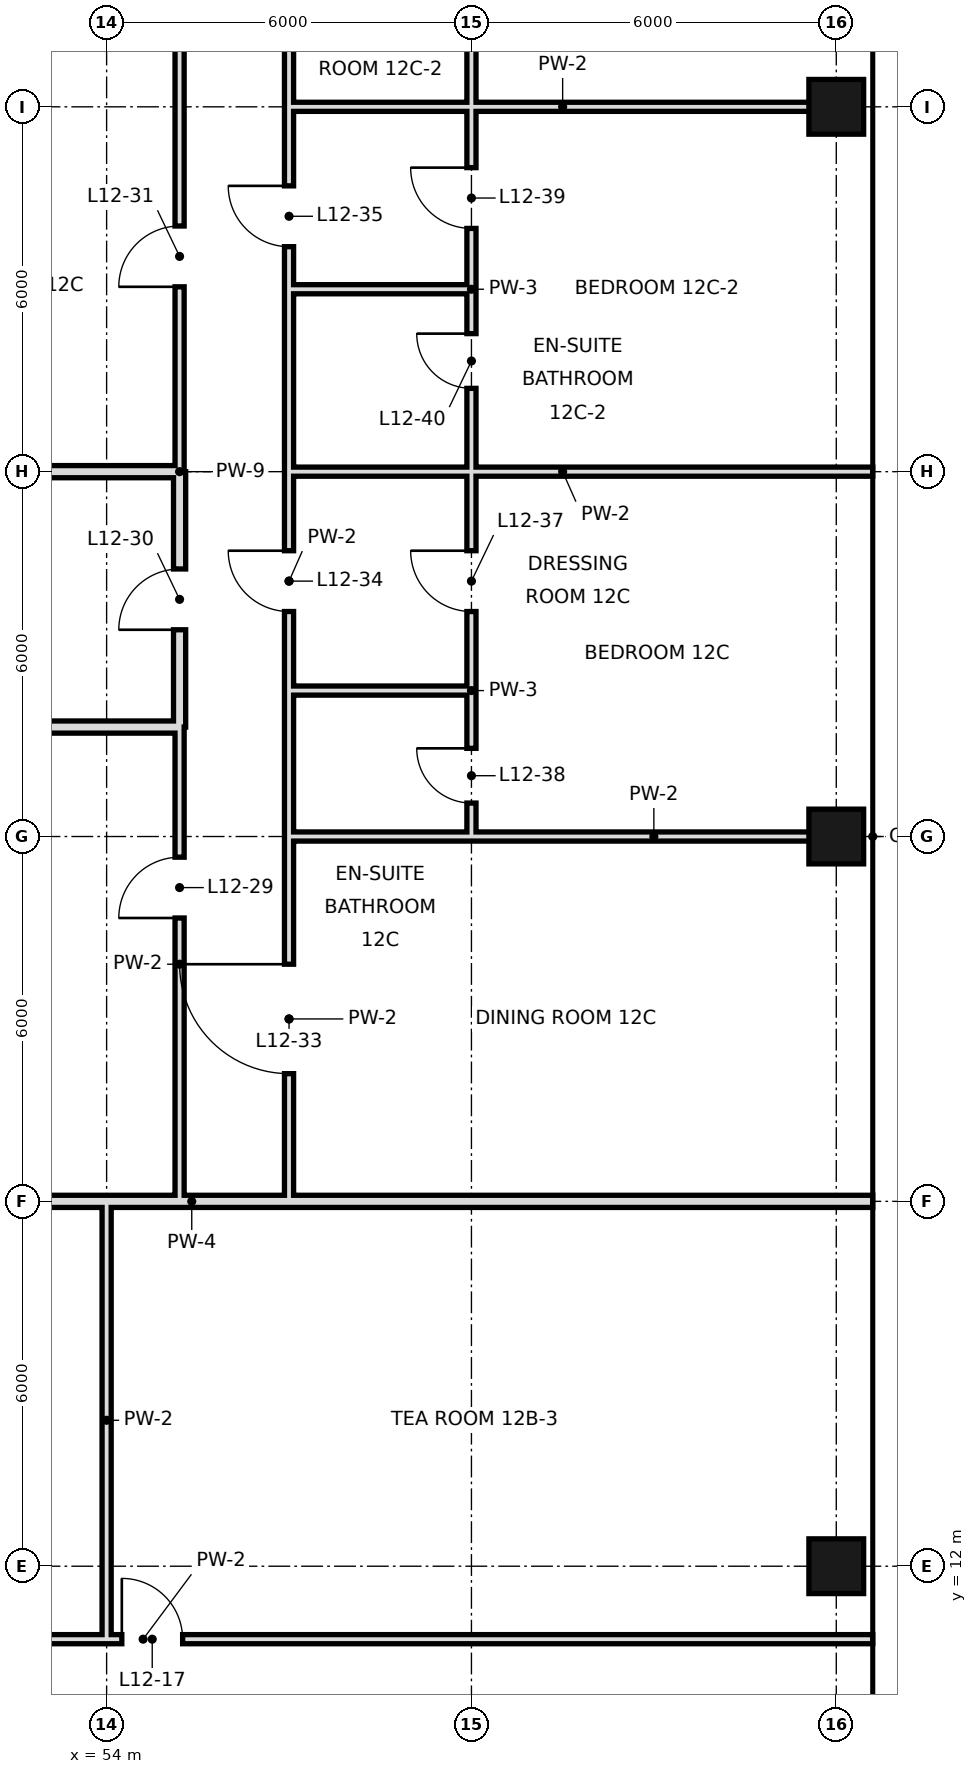
"""IFC4 building model, lengths in metres.
Left out: names, types, materials, properties, quantities, classifications, styles, units other than length and angle.
Written with IfcOpenShell. Run it as: python <this file> out.ifc"""

import sys

from ifc_helpers import new_model, si_unit, direction, frame, frame_2d, origin, origin_2d, place, context, subcontext, project, spatial, rectangle, hollow_rectangle, extrude, element, fill, save


model = new_model("IFC4")
c1 = context("Model", 3, precision=1e-05, world=origin(), true_north=direction((0.0, 1.0)))
c2 = subcontext(c1, "Body", "Model", "MODEL_VIEW")
j1 = project(units=[si_unit("LENGTHUNIT", "METRE"), si_unit("PLANEANGLEUNIT", "RADIAN")], contexts=[c1])
p1 = place(None, origin())
s1 = spatial("IfcSite", under=j1, at=p1, CompositionType="ELEMENT")
p2 = place(p1, origin())
s2 = spatial("IfcBuilding", under=s1, at=p2, CompositionType="ELEMENT")
p3 = place(p2, frame((0.0, 0.0, 64.2)))
s3 = spatial("IfcBuildingStorey", under=s2, at=p3, CompositionType="ELEMENT", Elevation=64.2)
for number, where, z_axis, x_axis in (
    (1, (66.0, 12.0, 0.0), (0.0, 0.0, 1.0), (1.0, 0.0, 0.0)),
    (2, (66.0, 24.0, 0.0), (0.0, 0.0, 1.0), (1.0, 0.0, 0.0)),
    (3, (66.0, 36.0, 0.0), (0.0, 0.0, 1.0), (1.0, 0.0, 0.0)),
):
    element("IfcColumn", number, at=place(p3, frame(where, z_axis=z_axis, x_axis=x_axis)), inside=s3, PredefinedType="COLUMN", context=c2, shape_type="SweptSolid", body=[
        extrude(hollow_rectangle(XDim=0.9, YDim=0.9, WallThickness=0.045, at=origin_2d()), origin(), (0.0, 0.0, 1.0), 3.6),
    ])
p4 = place(p3, frame((54.0, 10.8, 0.0), z_axis=(0.0, 0.0, 1.0), x_axis=(0.0, 1.0, 0.0)))
e4 = element("IfcWall", 4, at=p4, inside=s3, PredefinedType="PARTITIONING", context=c2, shape_type="SweptSolid", body=[
    extrude(rectangle(XDim=7.2, YDim=0.15, at=frame_2d((3.6, 0.0))), origin(), (0.0, 0.0, 1.0), 3.42),
])
p5 = place(p3, frame((55.2, 25.8, 0.0), z_axis=(0.0, 0.0, 1.0), x_axis=(0.0, 1.0, 0.0)))
e5 = element("IfcWall", 5, at=p5, inside=s3, PredefinedType="SOLIDWALL", context=c2, shape_type="SweptSolid", body=[
    extrude(rectangle(XDim=4.2, YDim=0.2, at=frame_2d((2.1, 0.0))), origin(), (0.0, 0.0, 1.0), 2.52),
])
p6 = place(p5, frame((1.6, 0.0, 0.0)))
e6 = element("IfcOpeningElement", 6, at=p6, cuts=e5, PredefinedType="OPENING", context=c2, shape_type="SweptSolid", body=[
    extrude(rectangle(XDim=1.0, YDim=2.4, at=frame_2d((0.5, 1.2))), frame((0.0, 0.11, 0.0), z_axis=(0.0, -1.0, 0.0), x_axis=(1.0, 0.0, 0.0)), (0.0, 0.0, 1.0), 0.22),
])
p7 = place(p3, frame((55.2, 18.0, 0.0), z_axis=(0.0, 0.0, 1.0), x_axis=(0.0, 1.0, 0.0)))
e7 = element("IfcWall", 7, at=p7, inside=s3, PredefinedType="PARTITIONING", context=c2, shape_type="SweptSolid", body=[
    extrude(rectangle(XDim=7.8, YDim=0.15, at=frame_2d((3.9, 0.0))), origin(), (0.0, 0.0, 1.0), 3.42),
])
p8 = place(p7, frame((4.66, 0.0, 0.0)))
e8 = element("IfcOpeningElement", 8, at=p8, cuts=e7, PredefinedType="OPENING", context=c2, shape_type="SweptSolid", body=[
    extrude(rectangle(XDim=1.0, YDim=2.4, at=frame_2d((0.5, 1.2))), frame((0.0, 0.085, 0.0), z_axis=(0.0, -1.0, 0.0), x_axis=(1.0, 0.0, 0.0)), (0.0, 0.0, 1.0), 0.17),
])
p9 = place(p3, frame((55.2, 30.0, 0.0), z_axis=(0.0, 0.0, 1.0), x_axis=(0.0, 1.0, 0.0)))
e9 = element("IfcWall", 9, at=p9, inside=s3, PredefinedType="PARTITIONING", context=c2, shape_type="SweptSolid", body=[
    extrude(rectangle(XDim=15.6, YDim=0.15, at=frame_2d((7.8, 0.0))), origin(), (0.0, 0.0, 1.0), 3.42),
])
p10 = place(p9, frame((12.7, 0.0, 0.0)))
e10 = element("IfcOpeningElement", 10, at=p10, cuts=e9, PredefinedType="OPENING", context=c2, shape_type="SweptSolid", body=[
    extrude(rectangle(XDim=1.0, YDim=2.4, at=frame_2d((0.5, 1.2))), frame((0.0, 0.085, 0.0), z_axis=(0.0, -1.0, 0.0), x_axis=(1.0, 0.0, 0.0)), (0.0, 0.0, 1.0), 0.17),
])
p11 = place(p9, frame((3.04, 0.0, 0.0)))
e11 = element("IfcOpeningElement", 11, at=p11, cuts=e9, PredefinedType="OPENING", context=c2, shape_type="SweptSolid", body=[
    extrude(rectangle(XDim=1.0, YDim=2.4, at=frame_2d((0.5, 1.2))), frame((0.0, 0.085, 0.0), z_axis=(0.0, -1.0, 0.0), x_axis=(1.0, 0.0, 0.0)), (0.0, 0.0, 1.0), 0.17),
])
p12 = place(p3, frame((57.0, 18.0, 0.0), z_axis=(0.0, 0.0, 1.0), x_axis=(0.0, 1.0, 0.0)))
e12 = element("IfcWall", 12, at=p12, inside=s3, PredefinedType="PARTITIONING", context=c2, shape_type="SweptSolid", body=[
    extrude(rectangle(XDim=6.0, YDim=0.15, at=frame_2d((3.0, 0.0))), origin(), (0.0, 0.0, 1.0), 3.42),
])
p13 = place(p12, frame((2.1, 0.0, 0.0)))
e13 = element("IfcOpeningElement", 13, at=p13, cuts=e12, PredefinedType="OPENING", context=c2, shape_type="SweptSolid", body=[
    extrude(rectangle(XDim=1.8, YDim=2.4, at=frame_2d((0.9, 1.2))), frame((0.0, 0.085, 0.0), z_axis=(0.0, -1.0, 0.0), x_axis=(1.0, 0.0, 0.0)), (0.0, 0.0, 1.0), 0.17),
])
p14 = place(p3, frame((57.0, 26.4, 0.0), z_axis=(0.0, 0.0, 1.0), x_axis=(0.0, 1.0, 0.0)))
e14 = element("IfcWall", 14, at=p14, inside=s3, PredefinedType="PARTITIONING", context=c2, shape_type="SweptSolid", body=[
    extrude(rectangle(XDim=3.6, YDim=0.15, at=frame_2d((1.8, 0.0))), origin(), (0.0, 0.0, 1.0), 3.42),
])
p15 = place(p14, frame((1.3, 0.0, 0.0)))
e15 = element("IfcOpeningElement", 15, at=p15, cuts=e14, PredefinedType="OPENING", context=c2, shape_type="SweptSolid", body=[
    extrude(rectangle(XDim=1.0, YDim=2.4, at=frame_2d((0.5, 1.2))), frame((0.0, 0.085, 0.0), z_axis=(0.0, -1.0, 0.0), x_axis=(1.0, 0.0, 0.0)), (0.0, 0.0, 1.0), 0.17),
])
p16 = place(p3, frame((57.0, 33.0, 0.0), z_axis=(0.0, 0.0, 1.0), x_axis=(0.0, 1.0, 0.0)))
e16 = element("IfcWall", 16, at=p16, inside=s3, PredefinedType="PARTITIONING", context=c2, shape_type="SweptSolid", body=[
    extrude(rectangle(XDim=15.6, YDim=0.15, at=frame_2d((7.8, 0.0))), origin(), (0.0, 0.0, 1.0), 3.42),
])
p17 = place(p16, frame((0.7, 0.0, 0.0)))
e17 = element("IfcOpeningElement", 17, at=p17, cuts=e16, PredefinedType="OPENING", context=c2, shape_type="SweptSolid", body=[
    extrude(rectangle(XDim=1.0, YDim=2.4, at=frame_2d((0.5, 1.2))), frame((0.0, 0.085, 0.0), z_axis=(0.0, -1.0, 0.0), x_axis=(1.0, 0.0, 0.0)), (0.0, 0.0, 1.0), 0.17),
])
p18 = place(p16, frame((10.04, 0.0, 0.0)))
e18 = element("IfcOpeningElement", 18, at=p18, cuts=e16, PredefinedType="OPENING", context=c2, shape_type="SweptSolid", body=[
    extrude(rectangle(XDim=1.8, YDim=2.4, at=frame_2d((0.9, 1.2))), frame((0.0, 0.085, 0.0), z_axis=(0.0, -1.0, 0.0), x_axis=(1.0, 0.0, 0.0)), (0.0, 0.0, 1.0), 0.17),
])
p19 = place(p3, frame((57.0, 24.0, 0.0), z_axis=(0.0, 0.0, 1.0), x_axis=(0.0, 1.0, 0.0)))
e19 = element("IfcWall", 19, at=p19, inside=s3, PredefinedType="PARTITIONING", context=c2, shape_type="SweptSolid", body=[
    extrude(rectangle(XDim=2.4, YDim=0.15, at=frame_2d((1.2, 0.0))), origin(), (0.0, 0.0, 1.0), 3.42),
])
p20 = place(p3, frame((57.0, 30.0, 0.0), z_axis=(0.0, 0.0, 1.0), x_axis=(0.0, 1.0, 0.0)))
e20 = element("IfcWall", 20, at=p20, inside=s3, PredefinedType="PARTITIONING", context=c2, shape_type="SweptSolid", body=[
    extrude(rectangle(XDim=3.0, YDim=0.15, at=frame_2d((1.5, 0.0))), origin(), (0.0, 0.0, 1.0), 3.42),
])
p21 = place(p3, frame((60.0, 26.4, 0.0), z_axis=(0.0, 0.0, 1.0), x_axis=(0.0, 1.0, 0.0)))
e21 = element("IfcWall", 21, at=p21, inside=s3, PredefinedType="PARTITIONING", context=c2, shape_type="SweptSolid", body=[
    extrude(rectangle(XDim=3.6, YDim=0.15, at=frame_2d((1.8, 0.0))), origin(), (0.0, 0.0, 1.0), 3.42),
])
p22 = place(p21, frame((1.3, 0.0, 0.0)))
e22 = element("IfcOpeningElement", 22, at=p22, cuts=e21, PredefinedType="OPENING", context=c2, shape_type="SweptSolid", body=[
    extrude(rectangle(XDim=1.0, YDim=2.4, at=frame_2d((0.5, 1.2))), frame((0.0, 0.085, 0.0), z_axis=(0.0, -1.0, 0.0), x_axis=(1.0, 0.0, 0.0)), (0.0, 0.0, 1.0), 0.17),
])
p23 = place(p3, frame((60.0, 33.0, 0.0), z_axis=(0.0, 0.0, 1.0), x_axis=(0.0, 1.0, 0.0)))
e23 = element("IfcWall", 23, at=p23, inside=s3, PredefinedType="PARTITIONING", context=c2, shape_type="SweptSolid", body=[
    extrude(rectangle(XDim=15.0, YDim=0.15, at=frame_2d((7.5, 0.0))), origin(), (0.0, 0.0, 1.0), 3.42),
])
p24 = place(p23, frame((1.0, 0.0, 0.0)))
e24 = element("IfcOpeningElement", 24, at=p24, cuts=e23, PredefinedType="OPENING", context=c2, shape_type="SweptSolid", body=[
    extrude(rectangle(XDim=1.0, YDim=2.4, at=frame_2d((0.5, 1.2))), frame((0.0, 0.085, 0.0), z_axis=(0.0, -1.0, 0.0), x_axis=(1.0, 0.0, 0.0)), (0.0, 0.0, 1.0), 0.17),
])
p25 = place(p23, frame((10.04, 0.0, 0.0)))
e25 = element("IfcOpeningElement", 25, at=p25, cuts=e23, PredefinedType="OPENING", context=c2, shape_type="SweptSolid", body=[
    extrude(rectangle(XDim=1.8, YDim=2.4, at=frame_2d((0.9, 1.2))), frame((0.0, 0.085, 0.0), z_axis=(0.0, -1.0, 0.0), x_axis=(1.0, 0.0, 0.0)), (0.0, 0.0, 1.0), 0.17),
])
p26 = place(p3, frame((60.0, 24.0, 0.0), z_axis=(0.0, 0.0, 1.0), x_axis=(0.0, 1.0, 0.0)))
e26 = element("IfcWall", 26, at=p26, inside=s3, PredefinedType="PARTITIONING", context=c2, shape_type="SweptSolid", body=[
    extrude(rectangle(XDim=2.4, YDim=0.15, at=frame_2d((1.2, 0.0))), origin(), (0.0, 0.0, 1.0), 3.42),
])
p27 = place(p26, frame((0.55, 0.0, 0.0)))
e27 = element("IfcOpeningElement", 27, at=p27, cuts=e26, PredefinedType="OPENING", context=c2, shape_type="SweptSolid", body=[
    extrude(rectangle(XDim=0.9, YDim=2.4, at=frame_2d((0.45, 1.2))), frame((0.0, 0.085, 0.0), z_axis=(0.0, -1.0, 0.0), x_axis=(1.0, 0.0, 0.0)), (0.0, 0.0, 1.0), 0.17),
])
p28 = place(p3, frame((60.0, 30.0, 0.0), z_axis=(0.0, 0.0, 1.0), x_axis=(0.0, 1.0, 0.0)))
e28 = element("IfcWall", 28, at=p28, inside=s3, PredefinedType="PARTITIONING", context=c2, shape_type="SweptSolid", body=[
    extrude(rectangle(XDim=3.0, YDim=0.15, at=frame_2d((1.5, 0.0))), origin(), (0.0, 0.0, 1.0), 3.42),
])
p29 = place(p28, frame((1.37, 0.0, 0.0)))
e29 = element("IfcOpeningElement", 29, at=p29, cuts=e28, PredefinedType="OPENING", context=c2, shape_type="SweptSolid", body=[
    extrude(rectangle(XDim=0.9, YDim=2.4, at=frame_2d((0.45, 1.2))), frame((0.0, 0.085, 0.0), z_axis=(0.0, -1.0, 0.0), x_axis=(1.0, 0.0, 0.0)), (0.0, 0.0, 1.0), 0.17),
])
p30 = place(p3, frame((42.6, 10.8, 0.0), z_axis=(0.0, 0.0, 1.0), x_axis=(1.0, 0.0, 0.0)))
e30 = element("IfcWall", 30, at=p30, inside=s3, PredefinedType="PARTITIONING", context=c2, shape_type="SweptSolid", body=[
    extrude(rectangle(XDim=24.0, YDim=0.15, at=frame_2d((12.0, 0.0))), origin(), (0.0, 0.0, 1.0), 3.42),
])
p31 = place(p30, frame((7.18, 0.0, 0.0)))
e31 = element("IfcOpeningElement", 31, at=p31, cuts=e30, PredefinedType="OPENING", context=c2, shape_type="SweptSolid", body=[
    extrude(rectangle(XDim=1.0, YDim=2.4, at=frame_2d((0.5, 1.2))), frame((0.0, 0.085, 0.0), z_axis=(0.0, -1.0, 0.0), x_axis=(1.0, 0.0, 0.0)), (0.0, 0.0, 1.0), 0.17),
])
p32 = place(p30, frame((11.65, 0.0, 0.0)))
e32 = element("IfcOpeningElement", 32, at=p32, cuts=e30, PredefinedType="OPENING", context=c2, shape_type="SweptSolid", body=[
    extrude(rectangle(XDim=1.0, YDim=2.4, at=frame_2d((0.5, 1.2))), frame((0.0, 0.085, 0.0), z_axis=(0.0, -1.0, 0.0), x_axis=(1.0, 0.0, 0.0)), (0.0, 0.0, 1.0), 0.17),
])
p33 = place(p3, frame((44.9, 18.0, 0.0), z_axis=(0.0, 0.0, 1.0), x_axis=(1.0, 0.0, 0.0)))
e33 = element("IfcWall", 33, at=p33, inside=s3, PredefinedType="SOLIDWALL", context=c2, shape_type="SweptSolid", body=[
    extrude(rectangle(XDim=21.7, YDim=0.2, at=frame_2d((10.85, 0.0))), origin(), (0.0, 0.0, 1.0), 2.52),
])
p34 = place(p3, frame((60.0, 24.0, 0.0), z_axis=(0.0, 0.0, 1.0), x_axis=(1.0, 0.0, 0.0)))
e34 = element("IfcWall", 34, at=p34, inside=s3, PredefinedType="PARTITIONING", context=c2, shape_type="SweptSolid", body=[
    extrude(rectangle(XDim=6.0, YDim=0.15, at=frame_2d((3.0, 0.0))), origin(), (0.0, 0.0, 1.0), 2.52),
])
p35 = place(p3, frame((57.0, 24.0, 0.0), z_axis=(0.0, 0.0, 1.0), x_axis=(1.0, 0.0, 0.0)))
e35 = element("IfcWall", 35, at=p35, inside=s3, PredefinedType="PARTITIONING", context=c2, shape_type="SweptSolid", body=[
    extrude(rectangle(XDim=3.0, YDim=0.15, at=frame_2d((1.5, 0.0))), origin(), (0.0, 0.0, 1.0), 2.52),
])
p36 = place(p3, frame((44.9, 25.8, 0.0), z_axis=(0.0, 0.0, 1.0), x_axis=(1.0, 0.0, 0.0)))
e36 = element("IfcWall", 36, at=p36, inside=s3, PredefinedType="SOLIDWALL", context=c2, shape_type="SweptSolid", body=[
    extrude(rectangle(XDim=10.3, YDim=0.2, at=frame_2d((5.15, 0.0))), origin(), (0.0, 0.0, 1.0), 2.97),
])
p37 = place(p3, frame((57.0, 26.4, 0.0), z_axis=(0.0, 0.0, 1.0), x_axis=(1.0, 0.0, 0.0)))
e37 = element("IfcWall", 37, at=p37, inside=s3, PredefinedType="PARTITIONING", context=c2, shape_type="SweptSolid", body=[
    extrude(rectangle(XDim=3.0, YDim=0.15, at=frame_2d((1.5, 0.0))), origin(), (0.0, 0.0, 1.0), 3.42),
])
p38 = place(p3, frame((44.9, 30.0, 0.0), z_axis=(0.0, 0.0, 1.0), x_axis=(1.0, 0.0, 0.0)))
e38 = element("IfcWall", 38, at=p38, inside=s3, PredefinedType="SOLIDWALL", context=c2, shape_type="SweptSolid", body=[
    extrude(rectangle(XDim=10.3, YDim=0.2, at=frame_2d((5.15, 0.0))), origin(), (0.0, 0.0, 1.0), 2.52),
])
p39 = place(p3, frame((60.0, 30.0, 0.0), z_axis=(0.0, 0.0, 1.0), x_axis=(1.0, 0.0, 0.0)))
e39 = element("IfcWall", 39, at=p39, inside=s3, PredefinedType="PARTITIONING", context=c2, shape_type="SweptSolid", body=[
    extrude(rectangle(XDim=6.6, YDim=0.15, at=frame_2d((3.3, 0.0))), origin(), (0.0, 0.0, 1.0), 2.52),
])
p40 = place(p3, frame((57.0, 30.0, 0.0), z_axis=(0.0, 0.0, 1.0), x_axis=(1.0, 0.0, 0.0)))
e40 = element("IfcWall", 40, at=p40, inside=s3, PredefinedType="PARTITIONING", context=c2, shape_type="SweptSolid", body=[
    extrude(rectangle(XDim=3.0, YDim=0.15, at=frame_2d((1.5, 0.0))), origin(), (0.0, 0.0, 1.0), 2.52),
])
p41 = place(p3, frame((57.0, 33.0, 0.0), z_axis=(0.0, 0.0, 1.0), x_axis=(1.0, 0.0, 0.0)))
e41 = element("IfcWall", 41, at=p41, inside=s3, PredefinedType="PARTITIONING", context=c2, shape_type="SweptSolid", body=[
    extrude(rectangle(XDim=3.0, YDim=0.15, at=frame_2d((1.5, 0.0))), origin(), (0.0, 0.0, 1.0), 3.42),
])
p42 = place(p3, frame((57.0, 36.0, 0.0), z_axis=(0.0, 0.0, 1.0), x_axis=(1.0, 0.0, 0.0)))
e42 = element("IfcWall", 42, at=p42, inside=s3, PredefinedType="PARTITIONING", context=c2, shape_type="SweptSolid", body=[
    extrude(rectangle(XDim=9.0, YDim=0.15, at=frame_2d((4.5, 0.0))), origin(), (0.0, 0.0, 1.0), 2.52),
])
p43 = place(p32, origin())
e43 = element("IfcDoor", 43, at=p43, inside=s3, OperationType="SINGLE_SWING_LEFT", PredefinedType="DOOR", context=c2, shape_type="SweptSolid", body=[
    extrude(rectangle(XDim=1.0, YDim=2.4, at=frame_2d((0.5, 1.2))), frame((0.0, 0.025, 0.0), z_axis=(0.0, -1.0, 0.0), x_axis=(1.0, 0.0, 0.0)), (0.0, 0.0, 1.0), 0.05),
])
fill(e32, e43)
p44 = place(p8, origin())
e44 = element("IfcDoor", 44, at=p44, inside=s3, OperationType="SINGLE_SWING_LEFT", PredefinedType="DOOR", context=c2, shape_type="SweptSolid", body=[
    extrude(rectangle(XDim=1.0, YDim=2.4, at=frame_2d((0.5, 1.2))), frame((0.0, 0.025, 0.0), z_axis=(0.0, -1.0, 0.0), x_axis=(1.0, 0.0, 0.0)), (0.0, 0.0, 1.0), 0.05),
])
fill(e8, e44)
p45 = place(p6, origin())
e45 = element("IfcDoor", 45, at=p45, inside=s3, OperationType="SINGLE_SWING_LEFT", PredefinedType="DOOR", context=c2, shape_type="SweptSolid", body=[
    extrude(rectangle(XDim=1.0, YDim=2.4, at=frame_2d((0.5, 1.2))), frame((0.0, 0.025, 0.0), z_axis=(0.0, -1.0, 0.0), x_axis=(1.0, 0.0, 0.0)), (0.0, 0.0, 1.0), 0.05),
])
fill(e6, e45)
p46 = place(p11, origin())
e46 = element("IfcDoor", 46, at=p46, inside=s3, OperationType="SINGLE_SWING_LEFT", PredefinedType="DOOR", context=c2, shape_type="SweptSolid", body=[
    extrude(rectangle(XDim=1.0, YDim=2.4, at=frame_2d((0.5, 1.2))), frame((0.0, 0.025, 0.0), z_axis=(0.0, -1.0, 0.0), x_axis=(1.0, 0.0, 0.0)), (0.0, 0.0, 1.0), 0.05),
])
fill(e11, e46)
p47 = place(p13, frame((1.8, 0.0, 0.0), z_axis=(0.0, 0.0, 1.0), x_axis=(-1.0, 0.0, 0.0)))
e47 = element("IfcDoor", 47, at=p47, inside=s3, OperationType="SINGLE_SWING_LEFT", PredefinedType="DOOR", context=c2, shape_type="SweptSolid", body=[
    extrude(rectangle(XDim=1.8, YDim=2.4, at=frame_2d((0.9, 1.2))), frame((0.0, 0.025, 0.0), z_axis=(0.0, -1.0, 0.0), x_axis=(1.0, 0.0, 0.0)), (0.0, 0.0, 1.0), 0.05),
])
fill(e13, e47)
p48 = place(p15, frame((1.0, 0.0, 0.0), z_axis=(0.0, 0.0, 1.0), x_axis=(-1.0, 0.0, 0.0)))
e48 = element("IfcDoor", 48, at=p48, inside=s3, OperationType="SINGLE_SWING_LEFT", PredefinedType="DOOR", context=c2, shape_type="SweptSolid", body=[
    extrude(rectangle(XDim=1.0, YDim=2.4, at=frame_2d((0.5, 1.2))), frame((0.0, 0.025, 0.0), z_axis=(0.0, -1.0, 0.0), x_axis=(1.0, 0.0, 0.0)), (0.0, 0.0, 1.0), 0.05),
])
fill(e15, e48)
p49 = place(p17, frame((1.0, 0.0, 0.0), z_axis=(0.0, 0.0, 1.0), x_axis=(-1.0, 0.0, 0.0)))
e49 = element("IfcDoor", 49, at=p49, inside=s3, OperationType="SINGLE_SWING_LEFT", PredefinedType="DOOR", context=c2, shape_type="SweptSolid", body=[
    extrude(rectangle(XDim=1.0, YDim=2.4, at=frame_2d((0.5, 1.2))), frame((0.0, 0.025, 0.0), z_axis=(0.0, -1.0, 0.0), x_axis=(1.0, 0.0, 0.0)), (0.0, 0.0, 1.0), 0.05),
])
fill(e17, e49)
p50 = place(p22, frame((1.0, 0.0, 0.0), z_axis=(0.0, 0.0, 1.0), x_axis=(-1.0, 0.0, 0.0)))
e50 = element("IfcDoor", 50, at=p50, inside=s3, OperationType="SINGLE_SWING_LEFT", PredefinedType="DOOR", context=c2, shape_type="SweptSolid", body=[
    extrude(rectangle(XDim=1.0, YDim=2.4, at=frame_2d((0.5, 1.2))), frame((0.0, 0.025, 0.0), z_axis=(0.0, -1.0, 0.0), x_axis=(1.0, 0.0, 0.0)), (0.0, 0.0, 1.0), 0.05),
])
fill(e22, e50)
p51 = place(p27, frame((0.9, 0.0, 0.0), z_axis=(0.0, 0.0, 1.0), x_axis=(-1.0, 0.0, 0.0)))
e51 = element("IfcDoor", 51, at=p51, inside=s3, OperationType="SINGLE_SWING_LEFT", PredefinedType="DOOR", context=c2, shape_type="SweptSolid", body=[
    extrude(rectangle(XDim=0.9, YDim=2.4, at=frame_2d((0.45, 1.2))), frame((0.0, 0.025, 0.0), z_axis=(0.0, -1.0, 0.0), x_axis=(1.0, 0.0, 0.0)), (0.0, 0.0, 1.0), 0.05),
])
fill(e27, e51)
p52 = place(p24, frame((1.0, 0.0, 0.0), z_axis=(0.0, 0.0, 1.0), x_axis=(-1.0, 0.0, 0.0)))
e52 = element("IfcDoor", 52, at=p52, inside=s3, OperationType="SINGLE_SWING_LEFT", PredefinedType="DOOR", context=c2, shape_type="SweptSolid", body=[
    extrude(rectangle(XDim=1.0, YDim=2.4, at=frame_2d((0.5, 1.2))), frame((0.0, 0.025, 0.0), z_axis=(0.0, -1.0, 0.0), x_axis=(1.0, 0.0, 0.0)), (0.0, 0.0, 1.0), 0.05),
])
fill(e24, e52)
p53 = place(p29, frame((0.9, 0.0, 0.0), z_axis=(0.0, 0.0, 1.0), x_axis=(-1.0, 0.0, 0.0)))
e53 = element("IfcDoor", 53, at=p53, inside=s3, OperationType="SINGLE_SWING_LEFT", PredefinedType="DOOR", context=c2, shape_type="SweptSolid", body=[
    extrude(rectangle(XDim=0.9, YDim=2.4, at=frame_2d((0.45, 1.2))), frame((0.0, 0.025, 0.0), z_axis=(0.0, -1.0, 0.0), x_axis=(1.0, 0.0, 0.0)), (0.0, 0.0, 1.0), 0.05),
])
fill(e29, e53)
save(model, sys.argv[1])
